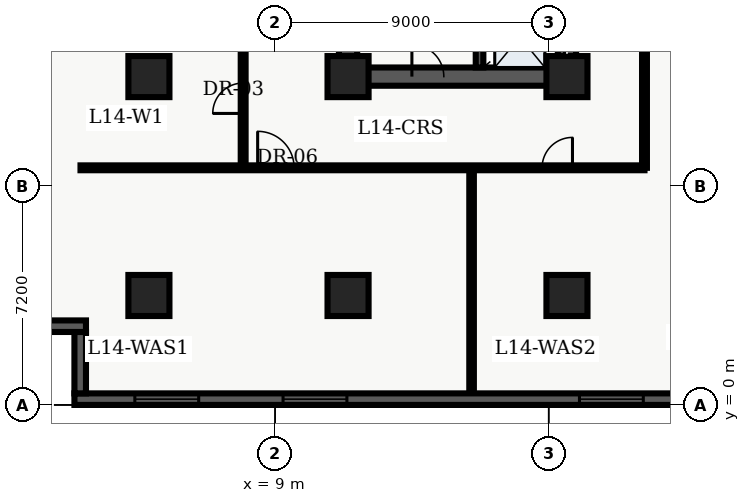
"""IFC4 building model, lengths in metres.
Left out: names, types, materials, properties, quantities, classifications, styles, units other than length and angle.
Written with IfcOpenShell. Run it as: python <this file> out.ifc"""

import sys

from ifc_helpers import new_model, entity, si_unit, converted_unit, direction, frame, origin_with_axes, origin_2d_with_axis, place, context, subcontext, project, spatial, polyline, rectangle, outline, extrude, element, fill, save


model = new_model("IFC4")
c1 = context("Model", 3, precision=1e-05, world=origin_with_axes(), true_north=direction((0.0, 1.0)))
c2 = subcontext(c1, "Body", "Model", "MODEL_VIEW")
j1 = project(units=[si_unit("LENGTHUNIT", "METRE"), converted_unit("PLANEANGLEUNIT", "DEGREE", entity("IfcPlaneAngleMeasure", 0.017), si_unit("PLANEANGLEUNIT", "RADIAN"), dimensions=[0, 0, 0, 0, 0, 0, 0])], contexts=[c1])
p1 = place(None, origin_with_axes())
s1 = spatial("IfcSite", under=j1, at=p1, CompositionType="ELEMENT")
p2 = place(p1, origin_with_axes())
s2 = spatial("IfcBuilding", under=s1, at=p2, CompositionType="ELEMENT")
p3 = place(p2, frame((0.0, 0.0, 60.0), z_axis=(0.0, 0.0, 1.0), x_axis=(1.0, 0.0, 0.0)))
s3 = spatial("IfcBuildingStorey", under=s2, at=p3, CompositionType="ELEMENT", Elevation=60.0)
p4 = place(p3, frame((11.4, 10.8, 0.0), z_axis=(0.0, 0.0, 1.0), x_axis=(0.0, 1.0, 0.0)))
e1 = element("IfcWall", 1, at=p4, inside=s3, PredefinedType="SHEAR", context=c2, shape_type="SweptSolid", body=[
    extrude(outline(polyline([(0.0, -0.3), (27.0, -0.3), (27.0, 0.3), (0.0, 0.3), (0.0, -0.3)])), origin_with_axes(), (0.0, 0.0, 1.0), 3.66),
])
p5 = place(p3, frame((11.4, 10.8, 0.0), z_axis=(0.0, 0.0, 1.0), x_axis=(1.0, 0.0, 0.0)))
e2 = element("IfcWall", 2, at=p5, inside=s3, PredefinedType="SHEAR", context=c2, shape_type="SweptSolid", body=[
    extrude(outline(polyline([(0.0, -0.3), (7.2, -0.3), (7.2, 0.3), (0.0, 0.3), (0.0, -0.3)])), origin_with_axes(), (0.0, 0.0, 1.0), 3.66),
])
p6 = place(p5, frame((2.625, 0.0, 0.0), z_axis=(0.0, 0.0, 1.0), x_axis=(1.0, 0.0, 0.0)))
e3 = element("IfcOpeningElement", 3, at=p6, cuts=e2, PredefinedType="OPENING", context=c2, shape_type="SweptSolid", body=[
    extrude(rectangle(XDim=1.05, YDim=0.62, at=origin_2d_with_axis()), origin_with_axes(), (0.0, 0.0, 1.0), 2.15),
])
p7 = place(p3, frame((18.6, 10.8, 0.0), z_axis=(0.0, 0.0, 1.0), x_axis=(0.0, 1.0, 0.0)))
e4 = element("IfcWall", 4, at=p7, inside=s3, PredefinedType="SHEAR", context=c2, shape_type="SweptSolid", body=[
    extrude(outline(polyline([(0.0, -0.3), (13.5, -0.3), (13.5, 0.3), (0.0, 0.3), (0.0, -0.3)])), origin_with_axes(), (0.0, 0.0, 1.0), 3.66),
])
p8 = place(p7, frame((1.3, 0.0, 0.0), z_axis=(0.0, 0.0, 1.0), x_axis=(1.0, 0.0, 0.0)))
e5 = element("IfcOpeningElement", 5, at=p8, cuts=e4, PredefinedType="OPENING", context=c2, shape_type="SweptSolid", body=[
    extrude(rectangle(XDim=1.1, YDim=0.62, at=origin_2d_with_axis()), origin_with_axes(), (0.0, 0.0, 1.0), 2.15),
])
p9 = place(p7, frame((3.4, 0.0, 0.0), z_axis=(0.0, 0.0, 1.0), x_axis=(1.0, 0.0, 0.0)))
e6 = element("IfcOpeningElement", 6, at=p9, cuts=e4, PredefinedType="OPENING", context=c2, shape_type="SweptSolid", body=[
    extrude(rectangle(XDim=1.1, YDim=0.62, at=origin_2d_with_axis()), origin_with_axes(), (0.0, 0.0, 1.0), 2.15),
])
p10 = place(p7, frame((11.125, 0.0, 0.0), z_axis=(0.0, 0.0, 1.0), x_axis=(1.0, 0.0, 0.0)))
e7 = element("IfcOpeningElement", 7, at=p10, cuts=e4, PredefinedType="OPENING", context=c2, shape_type="SweptSolid", body=[
    extrude(rectangle(XDim=1.05, YDim=0.62, at=origin_2d_with_axis()), origin_with_axes(), (0.0, 0.0, 1.0), 2.15),
])
p11 = place(p3, frame((15.725, 11.1, 0.0), z_axis=(0.0, 0.0, 1.0), x_axis=(0.0, 1.0, 0.0)))
e8 = element("IfcWall", 8, at=p11, inside=s3, PredefinedType="SHEAR", context=c2, shape_type="SweptSolid", body=[
    extrude(outline(polyline([(0.0, -0.125), (8.6, -0.125), (8.6, 0.125), (0.0, 0.125), (0.0, -0.125)])), origin_with_axes(), (0.0, 0.0, 1.0), 3.66),
])
for number, where, z_axis, x_axis in (
    (9, (11.4, 3.6, 0.0), (0.0, 0.0, 1.0), (1.0, 0.0, 0.0)),
    (10, (11.4, 10.8, 0.0), (0.0, 0.0, 1.0), (1.0, 0.0, 0.0)),
    (11, (18.6, 3.6, 0.0), (0.0, 0.0, 1.0), (1.0, 0.0, 0.0)),
    (12, (18.6, 10.8, 0.0), (0.0, 0.0, 1.0), (1.0, 0.0, 0.0)),
    (13, (4.85, 3.6, 0.0), (0.0, 0.0, 1.0), (1.0, 0.0, 0.0)),
    (14, (4.85, 10.8, 0.0), (0.0, 0.0, 1.0), (1.0, 0.0, 0.0)),
):
    element("IfcColumn", number, at=place(p3, frame(where, z_axis=z_axis, x_axis=x_axis)), inside=s3, PredefinedType="COLUMN", context=c2, shape_type="SweptSolid", body=[
        extrude(rectangle(XDim=1.35, YDim=1.35, at=origin_2d_with_axis()), origin_with_axes(), (0.0, 0.0, 1.0), 3.9),
    ])
p12 = place(p3, frame((2.6, 7.8, 0.0), z_axis=(0.0, 0.0, 1.0), x_axis=(1.0, 0.0, 0.0)))
e15 = element("IfcWall", 15, at=p12, inside=s3, PredefinedType="PARTITIONING", context=c2, shape_type="SweptSolid", body=[
    extrude(outline(polyline([(0.0, -0.08), (18.55, -0.08), (18.55, 0.08), (0.0, 0.08), (0.0, -0.08)])), origin_with_axes(), (0.0, 0.0, 1.0), 2.7),
])
p13 = place(p12, frame((6.426, 0.0, 0.0), z_axis=(0.0, 0.0, 1.0), x_axis=(1.0, 0.0, 0.0)))
e16 = element("IfcOpeningElement", 16, at=p13, cuts=e15, PredefinedType="OPENING", context=c2, shape_type="SweptSolid", body=[
    extrude(rectangle(XDim=1.2, YDim=0.18, at=origin_2d_with_axis()), origin_with_axes(), (0.0, 0.0, 1.0), 2.2),
])
p14 = place(p12, frame((15.681, 0.0, 0.0), z_axis=(0.0, 0.0, 1.0), x_axis=(1.0, 0.0, 0.0)))
e17 = element("IfcOpeningElement", 17, at=p14, cuts=e15, PredefinedType="OPENING", context=c2, shape_type="SweptSolid", body=[
    extrude(rectangle(XDim=1.0, YDim=0.18, at=origin_2d_with_axis()), origin_with_axes(), (0.0, 0.0, 1.0), 2.15),
])
p15 = place(p3, frame((21.15, 7.8, 0.0), z_axis=(0.0, 0.0, 1.0), x_axis=(0.0, 1.0, 0.0)))
e18 = element("IfcWall", 18, at=p15, inside=s3, PredefinedType="PARTITIONING", context=c2, shape_type="SweptSolid", body=[
    extrude(outline(polyline([(0.0, -0.08), (32.7, -0.08), (32.7, 0.08), (0.0, 0.08), (0.0, -0.08)])), origin_with_axes(), (0.0, 0.0, 1.0), 2.7),
])
p16 = place(p15, frame((6.675, 0.0, 0.0), z_axis=(0.0, 0.0, 1.0), x_axis=(1.0, 0.0, 0.0)))
e19 = element("IfcOpeningElement", 19, at=p16, cuts=e18, PredefinedType="OPENING", context=c2, shape_type="SweptSolid", body=[
    extrude(rectangle(XDim=1.05, YDim=0.18, at=origin_2d_with_axis()), origin_with_axes(), (0.0, 0.0, 1.0), 2.15),
])
p17 = place(p3, frame((7.95, 7.8, 0.0), z_axis=(0.0, 0.0, 1.0), x_axis=(0.0, 1.0, 0.0)))
e20 = element("IfcWall", 20, at=p17, inside=s3, PredefinedType="PARTITIONING", context=c2, shape_type="SweptSolid", body=[
    extrude(outline(polyline([(0.0, -0.08), (32.7, -0.08), (32.7, 0.08), (0.0, 0.08), (0.0, -0.08)])), origin_with_axes(), (0.0, 0.0, 1.0), 2.7),
])
p18 = place(p17, frame((2.288, 0.0, 0.0), z_axis=(0.0, 0.0, 1.0), x_axis=(1.0, 0.0, 0.0)))
e21 = element("IfcOpeningElement", 21, at=p18, cuts=e20, PredefinedType="OPENING", context=c2, shape_type="SweptSolid", body=[
    extrude(rectangle(XDim=1.0, YDim=0.18, at=origin_2d_with_axis()), origin_with_axes(), (0.0, 0.0, 1.0), 2.15),
])
p19 = place(p17, frame((6.971, 0.0, 0.0), z_axis=(0.0, 0.0, 1.0), x_axis=(1.0, 0.0, 0.0)))
e22 = element("IfcOpeningElement", 22, at=p19, cuts=e20, PredefinedType="OPENING", context=c2, shape_type="SweptSolid", body=[
    extrude(rectangle(XDim=1.0, YDim=0.18, at=origin_2d_with_axis()), origin_with_axes(), (0.0, 0.0, 1.0), 2.15),
])
p20 = place(p17, frame((12.598, 0.0, 0.0), z_axis=(0.0, 0.0, 1.0), x_axis=(1.0, 0.0, 0.0)))
e23 = element("IfcOpeningElement", 23, at=p20, cuts=e20, PredefinedType="OPENING", context=c2, shape_type="SweptSolid", body=[
    extrude(rectangle(XDim=1.0, YDim=0.18, at=origin_2d_with_axis()), origin_with_axes(), (0.0, 0.0, 1.0), 2.15),
])
p21 = place(p17, frame((19.386, 0.0, 0.0), z_axis=(0.0, 0.0, 1.0), x_axis=(1.0, 0.0, 0.0)))
e24 = element("IfcOpeningElement", 24, at=p21, cuts=e20, PredefinedType="OPENING", context=c2, shape_type="SweptSolid", body=[
    extrude(rectangle(XDim=1.0, YDim=0.18, at=origin_2d_with_axis()), origin_with_axes(), (0.0, 0.0, 1.0), 2.15),
])
p22 = place(p17, frame((27.82, 0.0, 0.0), z_axis=(0.0, 0.0, 1.0), x_axis=(1.0, 0.0, 0.0)))
e25 = element("IfcOpeningElement", 25, at=p22, cuts=e20, PredefinedType="OPENING", context=c2, shape_type="SweptSolid", body=[
    extrude(rectangle(XDim=1.0, YDim=0.18, at=origin_2d_with_axis()), origin_with_axes(), (0.0, 0.0, 1.0), 2.15),
])
p23 = place(p3, frame((15.463, 0.36, 0.0), z_axis=(0.0, 0.0, 1.0), x_axis=(0.0, 1.0, 0.0)))
e26 = element("IfcWall", 26, at=p23, inside=s3, PredefinedType="PARTITIONING", context=c2, shape_type="SweptSolid", body=[
    extrude(outline(polyline([(0.0, -0.075), (7.34, -0.075), (7.34, 0.075), (0.0, 0.075), (0.0, -0.075)])), origin_with_axes(), (0.0, 0.0, 1.0), 2.7),
])
p24 = place(p3, frame((57.22, 0.19, 0.0), z_axis=(0.0, 0.0, 1.0), x_axis=(-1.0, 0.0, 0.0)))
e27 = element("IfcWall", 27, at=p24, inside=s3, PredefinedType="SOLIDWALL", context=c2, shape_type="SweptSolid", body=[
    extrude(outline(polyline([(0.0, -0.19), (54.82, -0.19), (54.82, 0.19), (0.0, 0.19), (0.0, -0.19)])), origin_with_axes(), (0.0, 0.0, 1.0), 3.66),
])
p25 = place(p24, frame((3.037, 0.0, 0.45), z_axis=(0.0, 0.0, 1.0), x_axis=(1.0, 0.0, 0.0)))
e28 = element("IfcOpeningElement", 28, at=p25, cuts=e27, PredefinedType="OPENING", context=c2, shape_type="SweptSolid", body=[
    extrude(rectangle(XDim=2.1, YDim=0.4, at=origin_2d_with_axis()), origin_with_axes(), (0.0, 0.0, 1.0), 2.2),
])
p26 = place(p24, frame((7.912, 0.0, 0.45), z_axis=(0.0, 0.0, 1.0), x_axis=(1.0, 0.0, 0.0)))
e29 = element("IfcOpeningElement", 29, at=p26, cuts=e27, PredefinedType="OPENING", context=c2, shape_type="SweptSolid", body=[
    extrude(rectangle(XDim=2.1, YDim=0.4, at=origin_2d_with_axis()), origin_with_axes(), (0.0, 0.0, 1.0), 2.2),
])
p27 = place(p24, frame((12.786, 0.0, 0.45), z_axis=(0.0, 0.0, 1.0), x_axis=(1.0, 0.0, 0.0)))
e30 = element("IfcOpeningElement", 30, at=p27, cuts=e27, PredefinedType="OPENING", context=c2, shape_type="SweptSolid", body=[
    extrude(rectangle(XDim=2.1, YDim=0.4, at=origin_2d_with_axis()), origin_with_axes(), (0.0, 0.0, 1.0), 2.2),
])
p28 = place(p24, frame((17.661, 0.0, 0.45), z_axis=(0.0, 0.0, 1.0), x_axis=(1.0, 0.0, 0.0)))
e31 = element("IfcOpeningElement", 31, at=p28, cuts=e27, PredefinedType="OPENING", context=c2, shape_type="SweptSolid", body=[
    extrude(rectangle(XDim=2.1, YDim=0.4, at=origin_2d_with_axis()), origin_with_axes(), (0.0, 0.0, 1.0), 2.2),
])
p29 = place(p24, frame((22.535, 0.0, 0.45), z_axis=(0.0, 0.0, 1.0), x_axis=(1.0, 0.0, 0.0)))
e32 = element("IfcOpeningElement", 32, at=p29, cuts=e27, PredefinedType="OPENING", context=c2, shape_type="SweptSolid", body=[
    extrude(rectangle(XDim=2.1, YDim=0.4, at=origin_2d_with_axis()), origin_with_axes(), (0.0, 0.0, 1.0), 2.2),
])
p30 = place(p24, frame((27.41, 0.0, 0.45), z_axis=(0.0, 0.0, 1.0), x_axis=(1.0, 0.0, 0.0)))
e33 = element("IfcOpeningElement", 33, at=p30, cuts=e27, PredefinedType="OPENING", context=c2, shape_type="SweptSolid", body=[
    extrude(rectangle(XDim=2.1, YDim=0.4, at=origin_2d_with_axis()), origin_with_axes(), (0.0, 0.0, 1.0), 2.2),
])
p31 = place(p24, frame((32.285, 0.0, 0.45), z_axis=(0.0, 0.0, 1.0), x_axis=(1.0, 0.0, 0.0)))
e34 = element("IfcOpeningElement", 34, at=p31, cuts=e27, PredefinedType="OPENING", context=c2, shape_type="SweptSolid", body=[
    extrude(rectangle(XDim=2.1, YDim=0.4, at=origin_2d_with_axis()), origin_with_axes(), (0.0, 0.0, 1.0), 2.2),
])
p32 = place(p24, frame((37.159, 0.0, 0.45), z_axis=(0.0, 0.0, 1.0), x_axis=(1.0, 0.0, 0.0)))
e35 = element("IfcOpeningElement", 35, at=p32, cuts=e27, PredefinedType="OPENING", context=c2, shape_type="SweptSolid", body=[
    extrude(rectangle(XDim=2.1, YDim=0.4, at=origin_2d_with_axis()), origin_with_axes(), (0.0, 0.0, 1.0), 2.2),
])
p33 = place(p24, frame((46.908, 0.0, 0.45), z_axis=(0.0, 0.0, 1.0), x_axis=(1.0, 0.0, 0.0)))
e36 = element("IfcOpeningElement", 36, at=p33, cuts=e27, PredefinedType="OPENING", context=c2, shape_type="SweptSolid", body=[
    extrude(rectangle(XDim=2.1, YDim=0.4, at=origin_2d_with_axis()), origin_with_axes(), (0.0, 0.0, 1.0), 2.2),
])
p34 = place(p24, frame((51.783, 0.0, 0.45), z_axis=(0.0, 0.0, 1.0), x_axis=(1.0, 0.0, 0.0)))
e37 = element("IfcOpeningElement", 37, at=p34, cuts=e27, PredefinedType="OPENING", context=c2, shape_type="SweptSolid", body=[
    extrude(rectangle(XDim=2.1, YDim=0.4, at=origin_2d_with_axis()), origin_with_axes(), (0.0, 0.0, 1.0), 2.2),
])
p35 = place(p3, frame((2.59, 0.38, 0.0), z_axis=(0.0, 0.0, 1.0), x_axis=(0.0, 1.0, 0.0)))
e38 = element("IfcWall", 38, at=p35, inside=s3, PredefinedType="SOLIDWALL", context=c2, shape_type="SweptSolid", body=[
    extrude(outline(polyline([(0.0, -0.19), (2.02, -0.19), (2.02, 0.19), (0.0, 0.19), (0.0, -0.19)])), origin_with_axes(), (0.0, 0.0, 1.0), 3.66),
])
p36 = place(p3, frame((2.78, 2.59, 0.0), z_axis=(0.0, 0.0, 1.0), x_axis=(-1.0, 0.0, 0.0)))
e39 = element("IfcWall", 39, at=p36, inside=s3, PredefinedType="SOLIDWALL", context=c2, shape_type="SweptSolid", body=[
    extrude(outline(polyline([(0.0, -0.19), (2.78, -0.19), (2.78, 0.19), (0.0, 0.19), (0.0, -0.19)])), origin_with_axes(), (0.0, 0.0, 1.0), 3.66),
])
p37 = place(p7, frame((1.3, 0.0, 0.0), z_axis=(0.0, 0.0, 1.0), x_axis=(1.0, 0.0, 0.0)))
e40 = element("IfcDoor", 40, at=p37, inside=s3, OperationType="SLIDING_TO_LEFT", PredefinedType="DOOR", context=c2, shape_type="SweptSolid", body=[
    extrude(rectangle(XDim=1.1, YDim=0.09, at=origin_2d_with_axis()), origin_with_axes(), (0.0, 0.0, 1.0), 2.15),
])
fill(e5, e40)
p38 = place(p5, frame((2.625, 0.0, 0.0), z_axis=(0.0, 0.0, 1.0), x_axis=(1.0, 0.0, 0.0)))
e41 = element("IfcDoor", 41, at=p38, inside=s3, OperationType="SINGLE_SWING_LEFT", PredefinedType="DOOR", context=c2, shape_type="SweptSolid", body=[
    extrude(rectangle(XDim=1.05, YDim=0.09, at=origin_2d_with_axis()), origin_with_axes(), (0.0, 0.0, 1.0), 2.15),
])
fill(e3, e41)
p39 = place(p17, frame((2.288, 0.0, 0.0), z_axis=(0.0, 0.0, 1.0), x_axis=(1.0, 0.0, 0.0)))
e42 = element("IfcDoor", 42, at=p39, inside=s3, OperationType="SINGLE_SWING_LEFT", PredefinedType="DOOR", context=c2, shape_type="SweptSolid", body=[
    extrude(rectangle(XDim=1.0, YDim=0.09, at=origin_2d_with_axis()), origin_with_axes(), (0.0, 0.0, 1.0), 2.15),
])
fill(e21, e42)
p40 = place(p12, frame((6.426, 0.0, 0.0), z_axis=(0.0, 0.0, 1.0), x_axis=(1.0, 0.0, 0.0)))
e43 = element("IfcDoor", 43, at=p40, inside=s3, OperationType="SINGLE_SWING_LEFT", PredefinedType="DOOR", context=c2, shape_type="SweptSolid", body=[
    extrude(rectangle(XDim=1.2, YDim=0.09, at=origin_2d_with_axis()), origin_with_axes(), (0.0, 0.0, 1.0), 2.2),
])
fill(e16, e43)
p41 = place(p12, frame((15.681, 0.0, 0.0), z_axis=(0.0, 0.0, 1.0), x_axis=(1.0, 0.0, 0.0)))
e44 = element("IfcDoor", 44, at=p41, inside=s3, OperationType="SINGLE_SWING_RIGHT", PredefinedType="DOOR", context=c2, shape_type="SweptSolid", body=[
    extrude(rectangle(XDim=1.0, YDim=0.09, at=origin_2d_with_axis()), origin_with_axes(), (0.0, 0.0, 1.0), 2.15),
])
fill(e17, e44)
p42 = place(p24, frame((37.159, 0.0, 0.45), z_axis=(0.0, 0.0, 1.0), x_axis=(1.0, 0.0, 0.0)))
e45 = element("IfcWindow", 45, at=p42, inside=s3, PredefinedType="WINDOW", context=c2, shape_type="SweptSolid", body=[
    extrude(rectangle(XDim=2.1, YDim=0.09, at=origin_2d_with_axis()), origin_with_axes(), (0.0, 0.0, 1.0), 2.2),
])
fill(e35, e45)
p43 = place(p24, frame((46.908, 0.0, 0.45), z_axis=(0.0, 0.0, 1.0), x_axis=(1.0, 0.0, 0.0)))
e46 = element("IfcWindow", 46, at=p43, inside=s3, PredefinedType="WINDOW", context=c2, shape_type="SweptSolid", body=[
    extrude(rectangle(XDim=2.1, YDim=0.09, at=origin_2d_with_axis()), origin_with_axes(), (0.0, 0.0, 1.0), 2.2),
])
fill(e36, e46)
p44 = place(p24, frame((51.783, 0.0, 0.45), z_axis=(0.0, 0.0, 1.0), x_axis=(1.0, 0.0, 0.0)))
e47 = element("IfcWindow", 47, at=p44, inside=s3, PredefinedType="WINDOW", context=c2, shape_type="SweptSolid", body=[
    extrude(rectangle(XDim=2.1, YDim=0.09, at=origin_2d_with_axis()), origin_with_axes(), (0.0, 0.0, 1.0), 2.2),
])
fill(e37, e47)
save(model, sys.argv[1])
